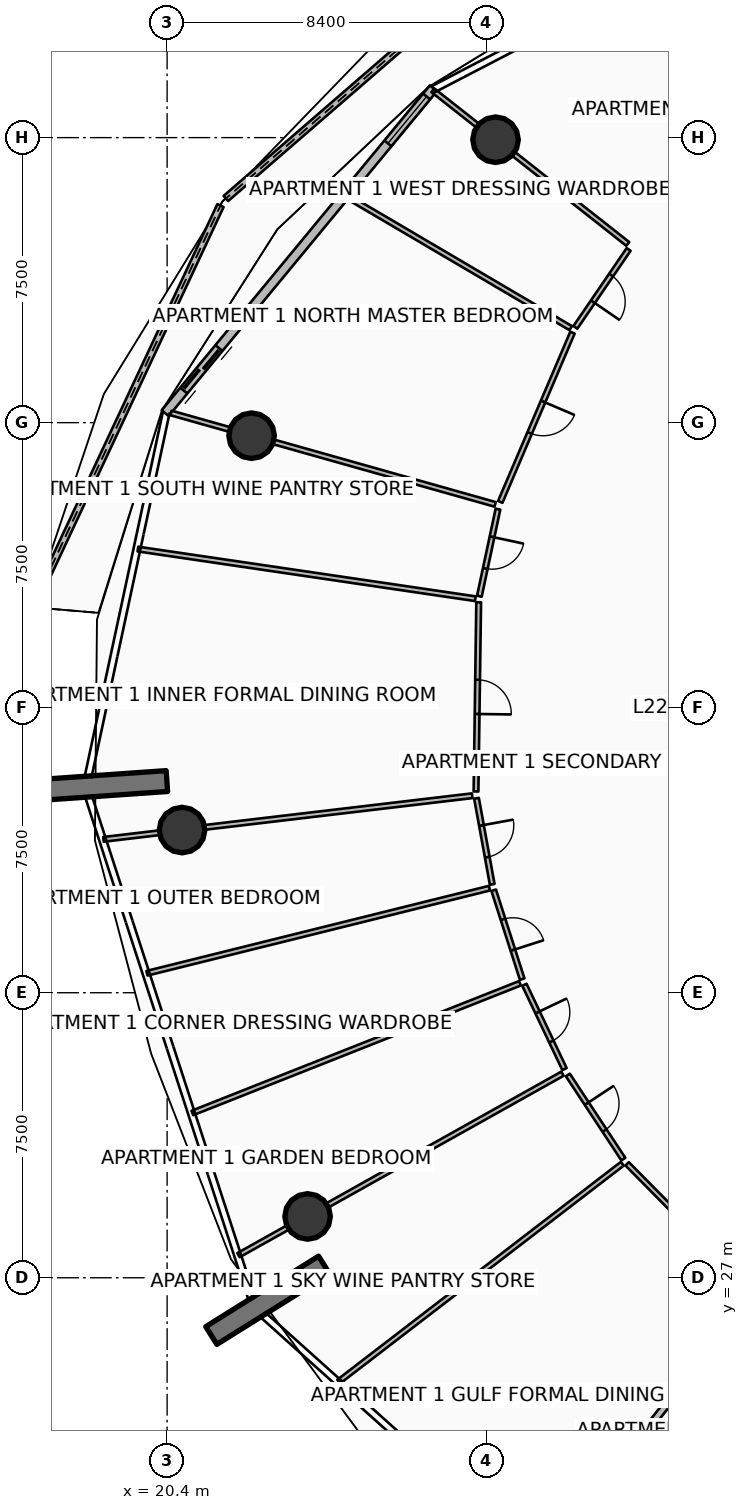
"""IFC4 building model, lengths in metres.
Left out: names, types, materials, properties, quantities, classifications, styles, units other than length and angle.
Written with IfcOpenShell. Run it as: python <this file> out.ifc"""

import sys

from ifc_helpers import new_model, si_unit, direction, frame, frame_2d, origin, origin_2d, place, context, subcontext, project, spatial, polyline, rectangle, circle, outline, extrude, element, fill, save


model = new_model("IFC4")
c1 = context("Model", 3, precision=1e-05, world=origin(), true_north=direction((0.0, 1.0)))
c2 = subcontext(c1, "Body", "Model", "MODEL_VIEW")
j1 = project(units=[si_unit("LENGTHUNIT", "METRE"), si_unit("PLANEANGLEUNIT", "RADIAN")], contexts=[c1])
p1 = place(None, origin())
s1 = spatial("IfcSite", under=j1, at=p1, CompositionType="ELEMENT")
p2 = place(p1, origin())
s2 = spatial("IfcBuilding", under=s1, at=p2, CompositionType="ELEMENT")
p3 = place(p2, frame((0.0, 0.0, 90.15)))
s3 = spatial("IfcBuildingStorey", under=s2, at=p3, CompositionType="ELEMENT", Elevation=90.15)
for number, where, z_axis, x_axis in (
    (1, (20.394, 40.07, 0.0), (0.0, 0.0, 1.0), (-0.998, -0.07, 0.0)),
    (2, (24.531, 27.335, 0.0), (0.0, 0.0, 1.0), (-0.848, -0.53, 0.0)),
):
    element("IfcWall", number, at=place(p3, frame(where, z_axis=z_axis, x_axis=x_axis)), inside=s3, PredefinedType="SOLIDWALL", context=c2, shape_type="SweptSolid", body=[
        extrude(rectangle(XDim=3.5, YDim=0.55, at=frame_2d((1.75, 0.0))), origin(), (0.0, 0.0, 1.0), 3.75),
    ])
for number, where, z_axis, x_axis in (
    (3, (29.042, 56.945, 0.0), (0.0, 0.0, 1.0), (1.0, 0.0, 0.0)),
    (4, (22.623, 49.157, 0.0), (0.0, 0.0, 1.0), (1.0, 0.0, 0.0)),
    (5, (20.793, 38.78, 0.0), (0.0, 0.0, 1.0), (1.0, 0.0, 0.0)),
    (6, (24.097, 28.614, 0.0), (0.0, 0.0, 1.0), (1.0, 0.0, 0.0)),
):
    element("IfcColumn", number, at=place(p3, frame(where, z_axis=z_axis, x_axis=x_axis)), inside=s3, PredefinedType="COLUMN", context=c2, shape_type="SweptSolid", body=[
        extrude(circle(Radius=0.6, at=origin_2d()), origin(), (0.0, 0.0, 1.0), 3.5),
    ])
p4 = place(p3, frame((30.22, 62.562, 0.0), z_axis=(0.0, 0.0, 1.0), x_axis=(-0.756090126882, -0.654467508766, 0.0)))
e7 = element("IfcWall", 7, at=p4, inside=s3, PredefinedType="PARAPET", context=c2, shape_type="SweptSolid", body=[
    extrude(outline(polyline([(0.0, 0.0), (10.943, 0.0), (10.943, 1.148), (5.471, 1.284), (0.0, 1.483), (0.0, 0.0)])), frame((0.0, 0.09, 0.0), z_axis=(0.0, -1.0, 0.0), x_axis=(1.0, 0.0, 0.0)), (0.0, 0.0, 1.0), 0.18),
])
p5 = place(p3, frame((21.805, 55.212, 0.0), z_axis=(0.0, 0.0, 1.0), x_axis=(-0.424200741769, -0.905568181134, 0.0)))
e8 = element("IfcWall", 8, at=p5, inside=s3, PredefinedType="PARAPET", context=c2, shape_type="SweptSolid", body=[
    extrude(outline(polyline([(0.0, 0.0), (11.672, 0.0), (11.672, 1.224), (5.836, 1.127), (0.0, 1.148), (0.0, 0.0)])), frame((0.0, 0.09, 0.0), z_axis=(0.0, -1.0, 0.0), x_axis=(1.0, 0.0, 0.0)), (0.0, 0.0, 1.0), 0.18),
])
p6 = place(p3, frame((27.407, 58.298, 0.0), z_axis=(0.0, 0.0, 1.0), x_axis=(-0.636704975, -0.771107498868, 0.0)))
e9 = element("IfcWall", 9, at=p6, inside=s3, PredefinedType="SOLIDWALL", context=c2, shape_type="SweptSolid", body=[
    extrude(rectangle(XDim=11.084, YDim=0.24, at=frame_2d((5.542, 0.0))), origin(), (0.0, 0.0, 1.0), 2.45),
])
p7 = place(p6, frame((8.864, 0.0, 0.0)))
e10 = element("IfcOpeningElement", 10, at=p7, cuts=e9, PredefinedType="OPENING", context=c2, shape_type="SweptSolid", body=[
    extrude(rectangle(XDim=1.45, YDim=2.15, at=frame_2d((0.725, 1.075))), frame((0.0, 0.13, 0.0), z_axis=(0.0, -1.0, 0.0), x_axis=(1.0, 0.0, 0.0)), (0.0, 0.0, 1.0), 0.26),
])
p8 = place(p6, frame((0.28, 0.0, 0.65)))
e11 = element("IfcOpeningElement", 11, at=p8, cuts=e9, PredefinedType="OPENING", context=c2, shape_type="SweptSolid", body=[
    extrude(rectangle(XDim=1.6, YDim=1.5, at=frame_2d((0.8, 0.75))), frame((0.0, 0.13, 0.0), z_axis=(0.0, -1.0, 0.0), x_axis=(1.0, 0.0, 0.0)), (0.0, 0.0, 1.0), 0.26),
])
p9 = place(p3, frame((39.575, 31.314, 0.0), z_axis=(0.0, 0.0, 1.0), x_axis=(-0.619083417853, -0.785325233098, 0.0)))
e12 = element("IfcWall", 12, at=p9, inside=s3, PredefinedType="PARTITIONING", context=c2, shape_type="SweptSolid", body=[
    extrude(rectangle(XDim=15.063, YDim=0.18, at=frame_2d((7.532, 0.0))), origin(), (0.0, 0.0, 1.0), 2.94),
])
p10 = place(p3, frame((32.522, 54.202, 0.0), z_axis=(0.0, 0.0, 1.0), x_axis=(-0.785296086335, 0.619120389574, 0.0)))
e13 = element("IfcWall", 13, at=p10, inside=s3, PredefinedType="PARTITIONING", context=c2, shape_type="SweptSolid", body=[
    extrude(rectangle(XDim=6.529, YDim=0.125, at=frame_2d((3.265, 0.0))), origin(), (0.0, 0.0, 1.0), 2.94),
])
p11 = place(p3, frame((31.021, 51.988, 0.0), z_axis=(0.0, 0.0, 1.0), x_axis=(-0.86191844443, 0.507046935846, 0.0)))
e14 = element("IfcWall", 14, at=p11, inside=s3, PredefinedType="PARTITIONING", context=c2, shape_type="SweptSolid", body=[
    extrude(rectangle(XDim=6.765, YDim=0.125, at=frame_2d((3.383, 0.0))), origin(), (0.0, 0.0, 1.0), 2.94),
])
p12 = place(p3, frame((32.544, 54.057, 0.0), z_axis=(0.0, 0.0, 1.0), x_axis=(-0.564377111566, -0.825517096092, 0.0)))
e15 = element("IfcWall", 15, at=p12, inside=s3, PredefinedType="PARTITIONING", context=c2, shape_type="SweptSolid", body=[
    extrude(rectangle(XDim=2.482, YDim=0.125, at=frame_2d((1.241, 0.0))), origin(), (0.0, 0.0, 1.0), 2.94),
])
p13 = place(p12, frame((0.816, 0.0, 0.0)))
e16 = element("IfcOpeningElement", 16, at=p13, cuts=e15, PredefinedType="OPENING", context=c2, shape_type="SweptSolid", body=[
    extrude(rectangle(XDim=0.85, YDim=2.06, at=frame_2d((0.425, 1.03))), frame((0.0, 0.073, 0.0), z_axis=(0.0, -1.0, 0.0), x_axis=(1.0, 0.0, 0.0)), (0.0, 0.0, 1.0), 0.145),
])
p14 = place(p3, frame((31.067, 51.868, 0.0), z_axis=(0.0, 0.0, 1.0), x_axis=(-0.392470533914, -0.919764578579, 0.0)))
e17 = element("IfcWall", 17, at=p14, inside=s3, PredefinedType="PARTITIONING", context=c2, shape_type="SweptSolid", body=[
    extrude(rectangle(XDim=4.842, YDim=0.125, at=frame_2d((2.421, 0.0))), origin(), (0.0, 0.0, 1.0), 2.94),
])
p15 = place(p14, frame((1.971, 0.0, 0.0)))
e18 = element("IfcOpeningElement", 18, at=p15, cuts=e17, PredefinedType="OPENING", context=c2, shape_type="SweptSolid", body=[
    extrude(rectangle(XDim=0.9, YDim=2.08, at=frame_2d((0.45, 1.04))), frame((0.0, 0.073, 0.0), z_axis=(0.0, -1.0, 0.0), x_axis=(1.0, 0.0, 0.0)), (0.0, 0.0, 1.0), 0.145),
])
p16 = place(p3, frame((29.031, 47.35, 0.0), z_axis=(0.0, 0.0, 1.0), x_axis=(-0.962455027906, 0.271441189317, 0.0)))
e19 = element("IfcWall", 19, at=p16, inside=s3, PredefinedType="PARTITIONING", context=c2, shape_type="SweptSolid", body=[
    extrude(rectangle(XDim=8.862, YDim=0.125, at=frame_2d((4.431, 0.0))), origin(), (0.0, 0.0, 1.0), 2.94),
])
p17 = place(p3, frame((28.511, 44.867, 0.0), z_axis=(0.0, 0.0, 1.0), x_axis=(-0.989349459184, 0.145559773332, 0.0)))
e20 = element("IfcWall", 20, at=p17, inside=s3, PredefinedType="PARTITIONING", context=c2, shape_type="SweptSolid", body=[
    extrude(rectangle(XDim=8.975, YDim=0.125, at=frame_2d((4.488, 0.0))), origin(), (0.0, 0.0, 1.0), 2.94),
])
p18 = place(p3, frame((29.106, 47.225, 0.0), z_axis=(0.0, 0.0, 1.0), x_axis=(-0.208839045871, -0.977950025778, 0.0)))
e21 = element("IfcWall", 21, at=p18, inside=s3, PredefinedType="PARTITIONING", context=c2, shape_type="SweptSolid", body=[
    extrude(rectangle(XDim=2.344, YDim=0.125, at=frame_2d((1.172, 0.0))), origin(), (0.0, 0.0, 1.0), 2.94),
])
p19 = place(p18, frame((0.747, 0.0, 0.0)))
e22 = element("IfcOpeningElement", 22, at=p19, cuts=e21, PredefinedType="OPENING", context=c2, shape_type="SweptSolid", body=[
    extrude(rectangle(XDim=0.85, YDim=2.06, at=frame_2d((0.425, 1.03))), frame((0.0, 0.073, 0.0), z_axis=(0.0, -1.0, 0.0), x_axis=(1.0, 0.0, 0.0)), (0.0, 0.0, 1.0), 0.145),
])
p20 = place(p3, frame((28.599, 44.774, 0.0), z_axis=(0.0, 0.0, 1.0), x_axis=(-0.014168717323, -0.999899618687, 0.0)))
e23 = element("IfcWall", 23, at=p20, inside=s3, PredefinedType="PARTITIONING", context=c2, shape_type="SweptSolid", body=[
    extrude(rectangle(XDim=4.98, YDim=0.125, at=frame_2d((2.49, 0.0))), origin(), (0.0, 0.0, 1.0), 2.94),
])
p21 = place(p20, frame((2.04, 0.0, 0.0)))
e24 = element("IfcOpeningElement", 24, at=p21, cuts=e23, PredefinedType="OPENING", context=c2, shape_type="SweptSolid", body=[
    extrude(rectangle(XDim=0.9, YDim=2.08, at=frame_2d((0.45, 1.04))), frame((0.0, 0.073, 0.0), z_axis=(0.0, -1.0, 0.0), x_axis=(1.0, 0.0, 0.0)), (0.0, 0.0, 1.0), 0.145),
])
p22 = place(p3, frame((28.427, 39.683, 0.0), z_axis=(0.0, 0.0, 1.0), x_axis=(-0.993070374036, -0.117521198991, 0.0)))
e25 = element("IfcWall", 25, at=p22, inside=s3, PredefinedType="PARTITIONING", context=c2, shape_type="SweptSolid", body=[
    extrude(rectangle(XDim=9.77, YDim=0.125, at=frame_2d((4.885, 0.0))), origin(), (0.0, 0.0, 1.0), 2.94),
])
p23 = place(p3, frame((28.882, 37.251, 0.0), z_axis=(0.0, 0.0, 1.0), x_axis=(-0.970501778917, -0.241093959111, 0.0)))
e26 = element("IfcWall", 26, at=p23, inside=s3, PredefinedType="PARTITIONING", context=c2, shape_type="SweptSolid", body=[
    extrude(rectangle(XDim=9.286, YDim=0.125, at=frame_2d((4.643, 0.0))), origin(), (0.0, 0.0, 1.0), 2.94),
])
p24 = place(p3, frame((29.684, 34.748, 0.0), z_axis=(0.0, 0.0, 1.0), x_axis=(-0.929782203012, -0.36811011255, 0.0)))
e27 = element("IfcWall", 27, at=p24, inside=s3, PredefinedType="PARTITIONING", context=c2, shape_type="SweptSolid", body=[
    extrude(rectangle(XDim=9.271, YDim=0.125, at=frame_2d((4.635, 0.0))), origin(), (0.0, 0.0, 1.0), 2.94),
])
p25 = place(p3, frame((28.541, 39.616, 0.0), z_axis=(0.0, 0.0, 1.0), x_axis=(0.179631908925, -0.983733895571, 0.0)))
e28 = element("IfcWall", 28, at=p25, inside=s3, PredefinedType="PARTITIONING", context=c2, shape_type="SweptSolid", body=[
    extrude(rectangle(XDim=2.302, YDim=0.125, at=frame_2d((1.151, 0.0))), origin(), (0.0, 0.0, 1.0), 2.94),
])
p26 = place(p25, frame((0.726, 0.0, 0.0)))
e29 = element("IfcOpeningElement", 29, at=p26, cuts=e28, PredefinedType="OPENING", context=c2, shape_type="SweptSolid", body=[
    extrude(rectangle(XDim=0.85, YDim=2.06, at=frame_2d((0.425, 1.03))), frame((0.0, 0.073, 0.0), z_axis=(0.0, -1.0, 0.0), x_axis=(1.0, 0.0, 0.0)), (0.0, 0.0, 1.0), 0.145),
])
p27 = place(p3, frame((28.994, 37.197, 0.0), z_axis=(0.0, 0.0, 1.0), x_axis=(0.305352731689, -0.952239313014, 0.0)))
e30 = element("IfcWall", 30, at=p27, inside=s3, PredefinedType="PARTITIONING", context=c2, shape_type="SweptSolid", body=[
    extrude(rectangle(XDim=2.456, YDim=0.125, at=frame_2d((1.228, 0.0))), origin(), (0.0, 0.0, 1.0), 2.94),
])
p28 = place(p27, frame((0.803, 0.0, 0.0)))
e31 = element("IfcOpeningElement", 31, at=p28, cuts=e30, PredefinedType="OPENING", context=c2, shape_type="SweptSolid", body=[
    extrude(rectangle(XDim=0.85, YDim=2.06, at=frame_2d((0.425, 1.03))), frame((0.0, 0.073, 0.0), z_axis=(0.0, -1.0, 0.0), x_axis=(1.0, 0.0, 0.0)), (0.0, 0.0, 1.0), 0.145),
])
p29 = place(p3, frame((29.802, 34.709, 0.0), z_axis=(0.0, 0.0, 1.0), x_axis=(0.429431892781, -0.90309924674, 0.0)))
e32 = element("IfcWall", 32, at=p29, inside=s3, PredefinedType="PARTITIONING", context=c2, shape_type="SweptSolid", body=[
    extrude(rectangle(XDim=2.456, YDim=0.125, at=frame_2d((1.228, 0.0))), origin(), (0.0, 0.0, 1.0), 2.94),
])
p30 = place(p29, frame((0.803, 0.0, 0.0)))
e33 = element("IfcOpeningElement", 33, at=p30, cuts=e32, PredefinedType="OPENING", context=c2, shape_type="SweptSolid", body=[
    extrude(rectangle(XDim=0.85, YDim=2.06, at=frame_2d((0.425, 1.03))), frame((0.0, 0.073, 0.0), z_axis=(0.0, -1.0, 0.0), x_axis=(1.0, 0.0, 0.0)), (0.0, 0.0, 1.0), 0.145),
])
p31 = place(p3, frame((30.804, 32.37, 0.0), z_axis=(0.0, 0.0, 1.0), x_axis=(-0.872500902675, -0.488612499668, 0.0)))
e34 = element("IfcWall", 34, at=p31, inside=s3, PredefinedType="PARTITIONING", context=c2, shape_type="SweptSolid", body=[
    extrude(rectangle(XDim=9.77, YDim=0.125, at=frame_2d((4.885, 0.0))), origin(), (0.0, 0.0, 1.0), 2.94),
])
p32 = place(p3, frame((32.378, 30.0, 0.0), z_axis=(0.0, 0.0, 1.0), x_axis=(-0.793018359225, -0.609197736315, 0.0)))
e35 = element("IfcWall", 35, at=p32, inside=s3, PredefinedType="PARTITIONING", context=c2, shape_type="SweptSolid", body=[
    extrude(rectangle(XDim=9.409, YDim=0.125, at=frame_2d((4.704, 0.0))), origin(), (0.0, 0.0, 1.0), 2.94),
])
p33 = place(p3, frame((30.946, 32.335, 0.0), z_axis=(0.0, 0.0, 1.0), x_axis=(0.55037901545, -0.83491492941, 0.0)))
e36 = element("IfcWall", 36, at=p33, inside=s3, PredefinedType="PARTITIONING", context=c2, shape_type="SweptSolid", body=[
    extrude(rectangle(XDim=2.651, YDim=0.125, at=frame_2d((1.326, 0.0))), origin(), (0.0, 0.0, 1.0), 2.94),
])
p34 = place(p33, frame((0.901, 0.0, 0.0)))
e37 = element("IfcOpeningElement", 37, at=p34, cuts=e36, PredefinedType="OPENING", context=c2, shape_type="SweptSolid", body=[
    extrude(rectangle(XDim=0.85, YDim=2.06, at=frame_2d((0.425, 1.03))), frame((0.0, 0.073, 0.0), z_axis=(0.0, -1.0, 0.0), x_axis=(1.0, 0.0, 0.0)), (0.0, 0.0, 1.0), 0.145),
])
p35 = place(p3, frame((32.506, 29.998, 0.0), z_axis=(0.0, 0.0, 1.0), x_axis=(0.702626830151, -0.711558527144, 0.0)))
e38 = element("IfcWall", 38, at=p35, inside=s3, PredefinedType="PARTITIONING", context=c2, shape_type="SweptSolid", body=[
    extrude(rectangle(XDim=4.674, YDim=0.125, at=frame_2d((2.337, 0.0))), origin(), (0.0, 0.0, 1.0), 2.94),
])
p36 = place(p35, frame((1.887, 0.0, 0.0)))
e39 = element("IfcOpeningElement", 39, at=p36, cuts=e38, PredefinedType="OPENING", context=c2, shape_type="SweptSolid", body=[
    extrude(rectangle(XDim=0.9, YDim=2.08, at=frame_2d((0.45, 1.04))), frame((0.0, 0.073, 0.0), z_axis=(0.0, -1.0, 0.0), x_axis=(1.0, 0.0, 0.0)), (0.0, 0.0, 1.0), 0.145),
])
p37 = place(p3, frame((33.167, 23.024, 0.0), z_axis=(0.0, 0.0, 1.0), x_axis=(0.828134847694, -0.560528923459, 0.0)))
e40 = element("IfcWall", 40, at=p37, inside=s3, PredefinedType="PARTITIONING", context=c2, shape_type="SweptSolid", body=[
    extrude(rectangle(XDim=3.298, YDim=0.15, at=frame_2d((1.649, 0.0))), origin(), (0.0, 0.0, 1.0), 2.94),
])
p38 = place(p7, origin())
e41 = element("IfcDoor", 41, at=p38, inside=s3, OperationType="DOUBLE_DOOR_SLIDING", PredefinedType="DOOR", context=c2, shape_type="SweptSolid", body=[
    extrude(rectangle(XDim=1.45, YDim=2.15, at=frame_2d((0.725, 1.075))), frame((0.0, 0.025, 0.0), z_axis=(0.0, -1.0, 0.0), x_axis=(1.0, 0.0, 0.0)), (0.0, 0.0, 1.0), 0.05),
])
fill(e10, e41)
p39 = place(p8, origin())
e42 = element("IfcWindow", 42, at=p39, inside=s3, PartitioningType="SINGLE_PANEL", PredefinedType="WINDOW", context=c2, shape_type="SweptSolid", body=[
    extrude(rectangle(XDim=1.6, YDim=1.5, at=frame_2d((0.8, 0.75))), frame((0.0, 0.03, 0.0), z_axis=(0.0, -1.0, 0.0), x_axis=(1.0, 0.0, 0.0)), (0.0, 0.0, 1.0), 0.06),
])
fill(e11, e42)
p40 = place(p13, origin())
e43 = element("IfcDoor", 43, at=p40, inside=s3, OperationType="SINGLE_SWING_RIGHT", PredefinedType="DOOR", context=c2, shape_type="SweptSolid", body=[
    extrude(rectangle(XDim=0.85, YDim=2.06, at=frame_2d((0.425, 1.03))), frame((0.0, 0.025, 0.0), z_axis=(0.0, -1.0, 0.0), x_axis=(1.0, 0.0, 0.0)), (0.0, 0.0, 1.0), 0.05),
])
fill(e16, e43)
p41 = place(p15, origin())
e44 = element("IfcDoor", 44, at=p41, inside=s3, OperationType="SINGLE_SWING_LEFT", PredefinedType="DOOR", context=c2, shape_type="SweptSolid", body=[
    extrude(rectangle(XDim=0.9, YDim=2.08, at=frame_2d((0.45, 1.04))), frame((0.0, 0.025, 0.0), z_axis=(0.0, -1.0, 0.0), x_axis=(1.0, 0.0, 0.0)), (0.0, 0.0, 1.0), 0.05),
])
fill(e18, e44)
p42 = place(p19, origin())
e45 = element("IfcDoor", 45, at=p42, inside=s3, OperationType="SINGLE_SWING_LEFT", PredefinedType="DOOR", context=c2, shape_type="SweptSolid", body=[
    extrude(rectangle(XDim=0.85, YDim=2.06, at=frame_2d((0.425, 1.03))), frame((0.0, 0.025, 0.0), z_axis=(0.0, -1.0, 0.0), x_axis=(1.0, 0.0, 0.0)), (0.0, 0.0, 1.0), 0.05),
])
fill(e22, e45)
p43 = place(p21, origin())
e46 = element("IfcDoor", 46, at=p43, inside=s3, OperationType="SINGLE_SWING_RIGHT", PredefinedType="DOOR", context=c2, shape_type="SweptSolid", body=[
    extrude(rectangle(XDim=0.9, YDim=2.08, at=frame_2d((0.45, 1.04))), frame((0.0, 0.025, 0.0), z_axis=(0.0, -1.0, 0.0), x_axis=(1.0, 0.0, 0.0)), (0.0, 0.0, 1.0), 0.05),
])
fill(e24, e46)
p44 = place(p26, origin())
e47 = element("IfcDoor", 47, at=p44, inside=s3, OperationType="SINGLE_SWING_LEFT", PredefinedType="DOOR", context=c2, shape_type="SweptSolid", body=[
    extrude(rectangle(XDim=0.85, YDim=2.06, at=frame_2d((0.425, 1.03))), frame((0.0, 0.025, 0.0), z_axis=(0.0, -1.0, 0.0), x_axis=(1.0, 0.0, 0.0)), (0.0, 0.0, 1.0), 0.05),
])
fill(e29, e47)
p45 = place(p28, origin())
e48 = element("IfcDoor", 48, at=p45, inside=s3, OperationType="SINGLE_SWING_RIGHT", PredefinedType="DOOR", context=c2, shape_type="SweptSolid", body=[
    extrude(rectangle(XDim=0.85, YDim=2.06, at=frame_2d((0.425, 1.03))), frame((0.0, 0.025, 0.0), z_axis=(0.0, -1.0, 0.0), x_axis=(1.0, 0.0, 0.0)), (0.0, 0.0, 1.0), 0.05),
])
fill(e31, e48)
p46 = place(p30, origin())
e49 = element("IfcDoor", 49, at=p46, inside=s3, OperationType="SINGLE_SWING_LEFT", PredefinedType="DOOR", context=c2, shape_type="SweptSolid", body=[
    extrude(rectangle(XDim=0.85, YDim=2.06, at=frame_2d((0.425, 1.03))), frame((0.0, 0.025, 0.0), z_axis=(0.0, -1.0, 0.0), x_axis=(1.0, 0.0, 0.0)), (0.0, 0.0, 1.0), 0.05),
])
fill(e33, e49)
p47 = place(p34, origin())
e50 = element("IfcDoor", 50, at=p47, inside=s3, OperationType="SINGLE_SWING_LEFT", PredefinedType="DOOR", context=c2, shape_type="SweptSolid", body=[
    extrude(rectangle(XDim=0.85, YDim=2.06, at=frame_2d((0.425, 1.03))), frame((0.0, 0.025, 0.0), z_axis=(0.0, -1.0, 0.0), x_axis=(1.0, 0.0, 0.0)), (0.0, 0.0, 1.0), 0.05),
])
fill(e37, e50)
save(model, sys.argv[1])
